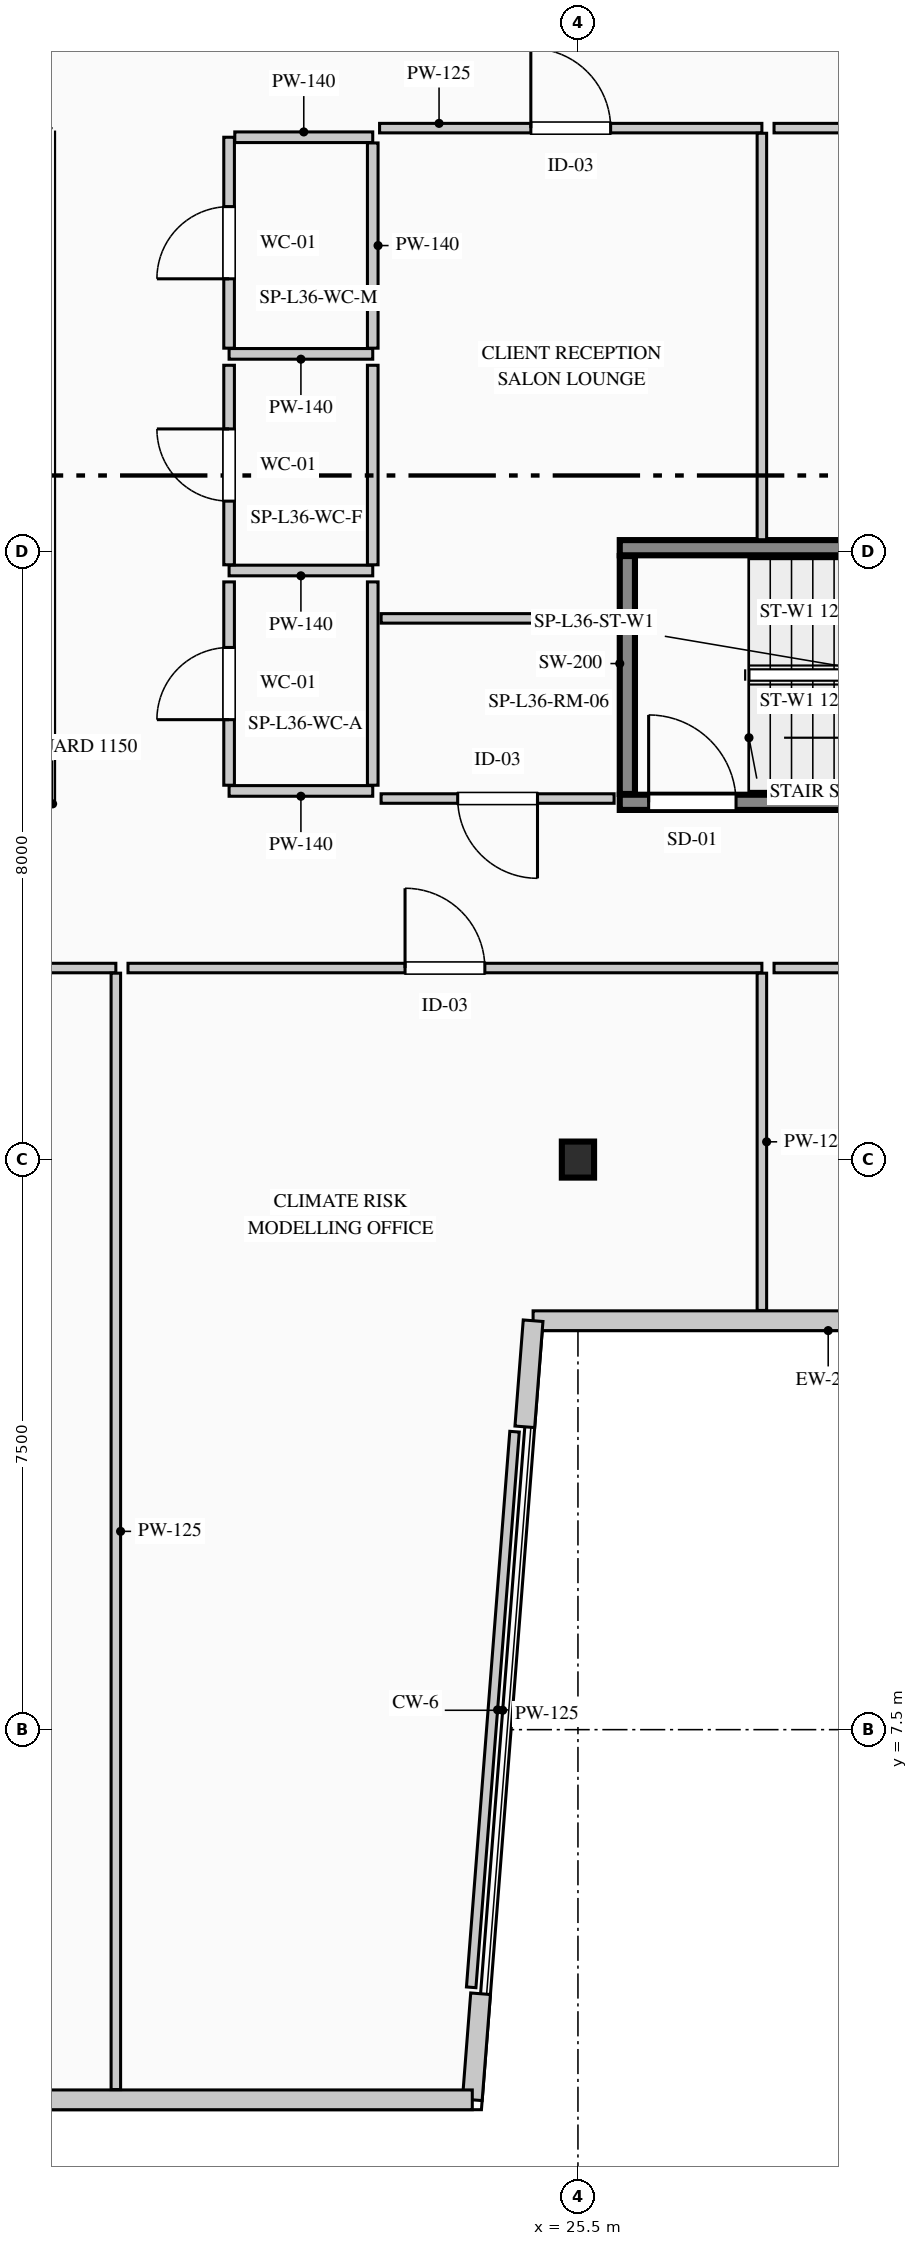
"""IFC4 building model, lengths in metres.
Left out: names, types, materials, properties, quantities, classifications, styles, units other than length and angle.
Written with IfcOpenShell. Run it as: python <this file> out.ifc"""

import sys

from ifc_helpers import new_model, si_unit, direction, frame, frame_2d, origin, origin_2d, place, context, subcontext, project, spatial, rectangle, i_section, extrude, element, fill, save


model = new_model("IFC4")
c1 = context("Model", 3, precision=1e-05, world=origin(), true_north=direction((0.0, 1.0)))
c2 = subcontext(c1, "Body", "Model", "MODEL_VIEW")
j1 = project(units=[si_unit("LENGTHUNIT", "METRE"), si_unit("PLANEANGLEUNIT", "RADIAN")], contexts=[c1])
p1 = place(None, origin())
s1 = spatial("IfcSite", under=j1, at=p1, CompositionType="ELEMENT")
p2 = place(p1, origin())
s2 = spatial("IfcBuilding", under=s1, at=p2, CompositionType="ELEMENT")
p3 = place(p2, frame((0.0, 0.0, 154.85)))
s3 = spatial("IfcBuildingStorey", under=s2, at=p3, CompositionType="ELEMENT", Elevation=154.85)
p4 = place(p3, frame((26.05, 19.7, 0.0), z_axis=(0.0, 0.0, 1.0), x_axis=(1.0, 0.0, 0.0)))
e1 = element("IfcWall", 1, at=p4, inside=s3, PredefinedType="SHEAR", context=c2, shape_type="SweptSolid", body=[
    extrude(rectangle(XDim=7.2, YDim=0.2, at=frame_2d((3.6, 0.0))), origin(), (0.0, 0.0, 1.0), 3.95),
])
p5 = place(p4, frame((0.38, 0.0, 0.0)))
e2 = element("IfcOpeningElement", 2, at=p5, cuts=e1, PredefinedType="OPENING", context=c2, shape_type="SweptSolid", body=[
    extrude(rectangle(XDim=1.15, YDim=2.2, at=frame_2d((0.575, 1.1))), frame((0.0, 0.11, 0.0), z_axis=(0.0, -1.0, 0.0), x_axis=(1.0, 0.0, 0.0)), (0.0, 0.0, 1.0), 0.22),
])
p6 = place(p3, frame((26.05, 23.05, 0.0), z_axis=(0.0, 0.0, 1.0), x_axis=(1.0, 0.0, 0.0)))
e3 = element("IfcWall", 3, at=p6, inside=s3, PredefinedType="SHEAR", context=c2, shape_type="SweptSolid", body=[
    extrude(rectangle(XDim=7.2, YDim=0.2, at=frame_2d((3.6, 0.0))), origin(), (0.0, 0.0, 1.0), 3.95),
])
p7 = place(p3, frame((26.15, 19.81, 0.0), z_axis=(0.0, 0.0, 1.0), x_axis=(0.0, 1.0, 0.0)))
e4 = element("IfcWall", 4, at=p7, inside=s3, PredefinedType="SHEAR", context=c2, shape_type="SweptSolid", body=[
    extrude(rectangle(XDim=3.13, YDim=0.2, at=frame_2d((1.565, 0.0))), origin(), (0.0, 0.0, 1.0), 3.95),
])
p8 = place(p3, frame((25.5, 15.0, 0.0), z_axis=(0.0, 0.0, 1.0), x_axis=(1.0, 0.0, 0.0)))
e5 = element("IfcColumn", 5, at=p8, inside=s3, PredefinedType="COLUMN", context=c2, shape_type="SweptSolid", body=[
    extrude(i_section(OverallWidth=0.424, OverallDepth=0.474, WebThickness=0.048, FlangeThickness=0.077, FilletRadius=0.015, at=origin_2d()), origin(), (0.0, 0.0, 1.0), 3.95),
])
p9 = place(p3, frame((32.675, 12.88, 0.0), z_axis=(0.0, 0.0, 1.0), x_axis=(-1.0, 0.0, 0.0)))
e6 = element("IfcWall", 6, at=p9, inside=s3, PredefinedType="STANDARD", context=c2, shape_type="SweptSolid", body=[
    extrude(rectangle(XDim=7.765, YDim=0.26, at=frame_2d((3.883, 0.0))), origin(), (0.0, 0.0, 1.0), 3.69),
])
p10 = place(p9, frame((1.896, 0.0, 0.9)))
e7 = element("IfcOpeningElement", 7, at=p10, cuts=e6, PredefinedType="OPENING", context=c2, shape_type="SweptSolid", body=[
    extrude(rectangle(XDim=1.8, YDim=2.1, at=frame_2d((0.9, 1.05))), frame((0.0, 0.14, 0.0), z_axis=(0.0, -1.0, 0.0), x_axis=(1.0, 0.0, 0.0)), (0.0, 0.0, 1.0), 0.28),
])
for number, where, z_axis, x_axis in (
    (8, (24.91, 12.88, 0.0), (0.0, 0.0, 1.0), (-0.078, -0.997, 0.0)),
    (9, (24.219, 4.026, 0.0), (0.0, 0.0, 1.0), (-0.078, -0.997, 0.0)),
):
    element("IfcWall", number, at=place(p3, frame(where, z_axis=z_axis, x_axis=x_axis)), inside=s3, PredefinedType="STANDARD", context=c2, shape_type="SweptSolid", body=[
        extrude(rectangle(XDim=1.4, YDim=0.26, at=frame_2d((0.7, 0.0))), origin(), (0.0, 0.0, 1.0), 3.69),
    ])
p11 = place(p3, frame((24.11, 2.63, 0.0), z_axis=(0.0, 0.0, 1.0), x_axis=(-1.0, 0.0, 0.0)))
e10 = element("IfcWall", 10, at=p11, inside=s3, PredefinedType="STANDARD", context=c2, shape_type="SweptSolid", body=[
    extrude(rectangle(XDim=13.71, YDim=0.26, at=frame_2d((6.855, 0.0))), origin(), (0.0, 0.0, 1.0), 3.69),
])
p12 = place(p11, frame((7.724, 0.0, 0.9)))
e11 = element("IfcOpeningElement", 11, at=p12, cuts=e10, PredefinedType="OPENING", context=c2, shape_type="SweptSolid", body=[
    extrude(rectangle(XDim=2.1, YDim=2.0, at=frame_2d((1.05, 1.0))), frame((0.0, 0.14, 0.0), z_axis=(0.0, -1.0, 0.0), x_axis=(1.0, 0.0, 0.0)), (0.0, 0.0, 1.0), 0.28),
])
p13 = place(p3, frame((22.8, 25.6, 0.0), z_axis=(0.0, 0.0, 1.0), x_axis=(-1.0, 0.0, 0.0)))
e12 = element("IfcWall", 12, at=p13, inside=s3, PredefinedType="PARTITIONING", context=c2, shape_type="SweptSolid", body=[
    extrude(rectangle(XDim=1.89, YDim=0.14, at=frame_2d((0.945, 0.0))), origin(), (0.0, 0.0, 1.0), 3.69),
])
p14 = place(p3, frame((20.91, 25.675, 0.0), z_axis=(0.0, 0.0, 1.0), x_axis=(0.0, 1.0, 0.0)))
e13 = element("IfcWall", 13, at=p14, inside=s3, PredefinedType="PARTITIONING", context=c2, shape_type="SweptSolid", body=[
    extrude(rectangle(XDim=2.775, YDim=0.14, at=frame_2d((1.387, 0.0))), origin(), (0.0, 0.0, 1.0), 3.69),
])
p15 = place(p14, frame((0.913, 0.0, 0.0)))
e14 = element("IfcOpeningElement", 14, at=p15, cuts=e13, PredefinedType="OPENING", context=c2, shape_type="SweptSolid", body=[
    extrude(rectangle(XDim=0.95, YDim=2.15, at=frame_2d((0.475, 1.075))), frame((0.0, 0.08, 0.0), z_axis=(0.0, -1.0, 0.0), x_axis=(1.0, 0.0, 0.0)), (0.0, 0.0, 1.0), 0.16),
])
p16 = place(p3, frame((20.985, 28.45, 0.0), z_axis=(0.0, 0.0, 1.0), x_axis=(1.0, 0.0, 0.0)))
e15 = element("IfcWall", 15, at=p16, inside=s3, PredefinedType="PARTITIONING", context=c2, shape_type="SweptSolid", body=[
    extrude(rectangle(XDim=1.815, YDim=0.14, at=frame_2d((0.907, 0.0))), origin(), (0.0, 0.0, 1.0), 3.69),
])
p17 = place(p3, frame((22.8, 28.375, 0.0), z_axis=(0.0, 0.0, 1.0), x_axis=(0.0, -1.0, 0.0)))
e16 = element("IfcWall", 16, at=p17, inside=s3, PredefinedType="PARTITIONING", context=c2, shape_type="SweptSolid", body=[
    extrude(rectangle(XDim=2.7, YDim=0.14, at=frame_2d((1.35, 0.0))), origin(), (0.0, 0.0, 1.0), 3.315),
])
p18 = place(p3, frame((22.8, 22.75, 0.0), z_axis=(0.0, 0.0, 1.0), x_axis=(-1.0, 0.0, 0.0)))
e17 = element("IfcWall", 17, at=p18, inside=s3, PredefinedType="PARTITIONING", context=c2, shape_type="SweptSolid", body=[
    extrude(rectangle(XDim=1.89, YDim=0.14, at=frame_2d((0.945, 0.0))), origin(), (0.0, 0.0, 1.0), 3.69),
])
p19 = place(p3, frame((20.91, 22.825, 0.0), z_axis=(0.0, 0.0, 1.0), x_axis=(0.0, 1.0, 0.0)))
e18 = element("IfcWall", 18, at=p19, inside=s3, PredefinedType="PARTITIONING", context=c2, shape_type="SweptSolid", body=[
    extrude(rectangle(XDim=2.625, YDim=0.14, at=frame_2d((1.312, 0.0))), origin(), (0.0, 0.0, 1.0), 3.69),
])
p20 = place(p19, frame((0.837, 0.0, 0.0)))
e19 = element("IfcOpeningElement", 19, at=p20, cuts=e18, PredefinedType="OPENING", context=c2, shape_type="SweptSolid", body=[
    extrude(rectangle(XDim=0.95, YDim=2.15, at=frame_2d((0.475, 1.075))), frame((0.0, 0.08, 0.0), z_axis=(0.0, -1.0, 0.0), x_axis=(1.0, 0.0, 0.0)), (0.0, 0.0, 1.0), 0.16),
])
p21 = place(p3, frame((22.8, 25.45, 0.0), z_axis=(0.0, 0.0, 1.0), x_axis=(0.0, -1.0, 0.0)))
e20 = element("IfcWall", 20, at=p21, inside=s3, PredefinedType="PARTITIONING", context=c2, shape_type="SweptSolid", body=[
    extrude(rectangle(XDim=2.625, YDim=0.14, at=frame_2d((1.312, 0.0))), origin(), (0.0, 0.0, 1.0), 3.315),
])
p22 = place(p3, frame((22.8, 19.85, 0.0), z_axis=(0.0, 0.0, 1.0), x_axis=(-1.0, 0.0, 0.0)))
e21 = element("IfcWall", 21, at=p22, inside=s3, PredefinedType="PARTITIONING", context=c2, shape_type="SweptSolid", body=[
    extrude(rectangle(XDim=1.89, YDim=0.14, at=frame_2d((0.945, 0.0))), origin(), (0.0, 0.0, 1.0), 3.69),
])
p23 = place(p3, frame((20.91, 19.925, 0.0), z_axis=(0.0, 0.0, 1.0), x_axis=(0.0, 1.0, 0.0)))
e22 = element("IfcWall", 22, at=p23, inside=s3, PredefinedType="PARTITIONING", context=c2, shape_type="SweptSolid", body=[
    extrude(rectangle(XDim=2.675, YDim=0.14, at=frame_2d((1.337, 0.0))), origin(), (0.0, 0.0, 1.0), 3.69),
])
p24 = place(p23, frame((0.863, 0.0, 0.0)))
e23 = element("IfcOpeningElement", 23, at=p24, cuts=e22, PredefinedType="OPENING", context=c2, shape_type="SweptSolid", body=[
    extrude(rectangle(XDim=0.95, YDim=2.15, at=frame_2d((0.475, 1.075))), frame((0.0, 0.08, 0.0), z_axis=(0.0, -1.0, 0.0), x_axis=(1.0, 0.0, 0.0)), (0.0, 0.0, 1.0), 0.16),
])
p25 = place(p3, frame((22.8, 22.6, 0.0), z_axis=(0.0, 0.0, 1.0), x_axis=(0.0, -1.0, 0.0)))
e24 = element("IfcWall", 24, at=p25, inside=s3, PredefinedType="PARTITIONING", context=c2, shape_type="SweptSolid", body=[
    extrude(rectangle(XDim=2.675, YDim=0.14, at=frame_2d((1.337, 0.0))), origin(), (0.0, 0.0, 1.0), 3.315),
])
p26 = place(p3, frame((10.88, 17.52, 0.0), z_axis=(0.0, 0.0, 1.0), x_axis=(1.0, 0.0, 0.0)))
e25 = element("IfcWall", 25, at=p26, inside=s3, PredefinedType="PARTITIONING", context=c2, shape_type="SweptSolid", body=[
    extrude(rectangle(XDim=8.54, YDim=0.125, at=frame_2d((4.27, 0.0))), origin(), (0.0, 0.0, 1.0), 3.69),
])
p27 = place(p26, frame((3.745, 0.0, 0.0)))
e26 = element("IfcOpeningElement", 26, at=p27, cuts=e25, PredefinedType="OPENING", context=c2, shape_type="SweptSolid", body=[
    extrude(rectangle(XDim=1.05, YDim=2.15, at=frame_2d((0.525, 1.075))), frame((0.0, 0.073, 0.0), z_axis=(0.0, -1.0, 0.0), x_axis=(1.0, 0.0, 0.0)), (0.0, 0.0, 1.0), 0.145),
])
p28 = place(p3, frame((19.42, 17.452, 0.0), z_axis=(0.0, 0.0, 1.0), x_axis=(0.0, -1.0, 0.0)))
e27 = element("IfcWall", 27, at=p28, inside=s3, PredefinedType="PARTITIONING", context=c2, shape_type="SweptSolid", body=[
    extrude(rectangle(XDim=14.688, YDim=0.125, at=frame_2d((7.344, 0.0))), origin(), (0.0, 0.0, 1.0), 3.69),
])
p29 = place(p3, frame((24.666, 11.42, 0.0), z_axis=(0.0, 0.0, 1.0), x_axis=(-0.077816821526, -0.996967673642, 0.0)))
e28 = element("IfcWall", 28, at=p29, inside=s3, PredefinedType="PARTITIONING", context=c2, shape_type="SweptSolid", body=[
    extrude(rectangle(XDim=7.332, YDim=0.125, at=frame_2d((3.666, 0.0))), origin(), (0.0, 0.0, 1.0), 3.69),
])
p30 = place(p3, frame((19.58, 17.52, 0.0), z_axis=(0.0, 0.0, 1.0), x_axis=(1.0, 0.0, 0.0)))
e29 = element("IfcWall", 29, at=p30, inside=s3, PredefinedType="PARTITIONING", context=c2, shape_type="SweptSolid", body=[
    extrude(rectangle(XDim=8.34, YDim=0.125, at=frame_2d((4.17, 0.0))), origin(), (0.0, 0.0, 1.0), 3.475),
])
p31 = place(p30, frame((3.645, 0.0, 0.0)))
e30 = element("IfcOpeningElement", 30, at=p31, cuts=e29, PredefinedType="OPENING", context=c2, shape_type="SweptSolid", body=[
    extrude(rectangle(XDim=1.05, YDim=2.15, at=frame_2d((0.525, 1.075))), frame((0.0, 0.073, 0.0), z_axis=(0.0, -1.0, 0.0), x_axis=(1.0, 0.0, 0.0)), (0.0, 0.0, 1.0), 0.145),
])
p32 = place(p3, frame((27.92, 17.452, 0.0), z_axis=(0.0, 0.0, 1.0), x_axis=(0.0, -1.0, 0.0)))
e31 = element("IfcWall", 31, at=p32, inside=s3, PredefinedType="PARTITIONING", context=c2, shape_type="SweptSolid", body=[
    extrude(rectangle(XDim=4.438, YDim=0.125, at=frame_2d((2.219, 0.0))), origin(), (0.0, 0.0, 1.0), 3.69),
])
p33 = place(p3, frame((28.08, 17.52, 0.0), z_axis=(0.0, 0.0, 1.0), x_axis=(1.0, 0.0, 0.0)))
e32 = element("IfcWall", 32, at=p33, inside=s3, PredefinedType="PARTITIONING", context=c2, shape_type="SweptSolid", body=[
    extrude(rectangle(XDim=8.04, YDim=0.125, at=frame_2d((4.02, 0.0))), origin(), (0.0, 0.0, 1.0), 3.475),
])
p34 = place(p33, frame((3.495, 0.0, 0.0)))
e33 = element("IfcOpeningElement", 33, at=p34, cuts=e32, PredefinedType="OPENING", context=c2, shape_type="SweptSolid", body=[
    extrude(rectangle(XDim=1.05, YDim=2.15, at=frame_2d((0.525, 1.075))), frame((0.0, 0.073, 0.0), z_axis=(0.0, -1.0, 0.0), x_axis=(1.0, 0.0, 0.0)), (0.0, 0.0, 1.0), 0.145),
])
p35 = place(p3, frame((25.976, 19.75, 0.0), z_axis=(0.0, 0.0, 1.0), x_axis=(-1.0, 0.0, 0.0)))
e34 = element("IfcWall", 34, at=p35, inside=s3, PredefinedType="PARTITIONING", context=c2, shape_type="SweptSolid", body=[
    extrude(rectangle(XDim=3.066, YDim=0.125, at=frame_2d((1.533, 0.0))), origin(), (0.0, 0.0, 1.0), 3.69),
])
p36 = place(p35, frame((1.008, 0.0, 0.0)))
e35 = element("IfcOpeningElement", 35, at=p36, cuts=e34, PredefinedType="OPENING", context=c2, shape_type="SweptSolid", body=[
    extrude(rectangle(XDim=1.05, YDim=2.15, at=frame_2d((0.525, 1.075))), frame((0.0, 0.073, 0.0), z_axis=(0.0, -1.0, 0.0), x_axis=(1.0, 0.0, 0.0)), (0.0, 0.0, 1.0), 0.145),
])
p37 = place(p3, frame((22.91, 22.12, 0.0), z_axis=(0.0, 0.0, 1.0), x_axis=(1.0, 0.0, 0.0)))
e36 = element("IfcWall", 36, at=p37, inside=s3, PredefinedType="PARTITIONING", context=c2, shape_type="SweptSolid", body=[
    extrude(rectangle(XDim=3.135, YDim=0.125, at=frame_2d((1.567, 0.0))), origin(), (0.0, 0.0, 1.0), 3.69),
])
p38 = place(p3, frame((22.89, 28.57, 0.0), z_axis=(0.0, 0.0, 1.0), x_axis=(1.0, 0.0, 0.0)))
e37 = element("IfcWall", 37, at=p38, inside=s3, PredefinedType="PARTITIONING", context=c2, shape_type="SweptSolid", body=[
    extrude(rectangle(XDim=5.03, YDim=0.125, at=frame_2d((2.515, 0.0))), origin(), (0.0, 0.0, 1.0), 3.475),
])
p39 = place(p38, frame((1.99, 0.0, 0.0)))
e38 = element("IfcOpeningElement", 38, at=p39, cuts=e37, PredefinedType="OPENING", context=c2, shape_type="SweptSolid", body=[
    extrude(rectangle(XDim=1.05, YDim=2.15, at=frame_2d((0.525, 1.075))), frame((0.0, 0.073, 0.0), z_axis=(0.0, -1.0, 0.0), x_axis=(1.0, 0.0, 0.0)), (0.0, 0.0, 1.0), 0.145),
])
p40 = place(p3, frame((27.92, 28.502, 0.0), z_axis=(0.0, 0.0, 1.0), x_axis=(0.0, -1.0, 0.0)))
e39 = element("IfcWall", 39, at=p40, inside=s3, PredefinedType="PARTITIONING", context=c2, shape_type="SweptSolid", body=[
    extrude(rectangle(XDim=5.347, YDim=0.125, at=frame_2d((2.674, 0.0))), origin(), (0.0, 0.0, 1.0), 3.69),
])
p41 = place(p3, frame((28.08, 28.57, 0.0), z_axis=(0.0, 0.0, 1.0), x_axis=(1.0, 0.0, 0.0)))
e40 = element("IfcWall", 40, at=p41, inside=s3, PredefinedType="PARTITIONING", context=c2, shape_type="SweptSolid", body=[
    extrude(rectangle(XDim=6.29, YDim=0.125, at=frame_2d((3.145, 0.0))), origin(), (0.0, 0.0, 1.0), 3.475),
])
p42 = place(p41, frame((2.62, 0.0, 0.0)))
e41 = element("IfcOpeningElement", 41, at=p42, cuts=e40, PredefinedType="OPENING", context=c2, shape_type="SweptSolid", body=[
    extrude(rectangle(XDim=1.05, YDim=2.15, at=frame_2d((0.525, 1.075))), frame((0.0, 0.073, 0.0), z_axis=(0.0, -1.0, 0.0), x_axis=(1.0, 0.0, 0.0)), (0.0, 0.0, 1.0), 0.145),
])
p43 = place(p5, origin())
e42 = element("IfcDoor", 42, at=p43, inside=s3, OperationType="SINGLE_SWING_LEFT", PredefinedType="DOOR", context=c2, shape_type="SweptSolid", body=[
    extrude(rectangle(XDim=1.15, YDim=2.2, at=frame_2d((0.575, 1.1))), frame((0.0, 0.025, 0.0), z_axis=(0.0, -1.0, 0.0), x_axis=(1.0, 0.0, 0.0)), (0.0, 0.0, 1.0), 0.05),
])
fill(e2, e42)
p44 = place(p15, origin())
e43 = element("IfcDoor", 43, at=p44, inside=s3, OperationType="SINGLE_SWING_LEFT", PredefinedType="DOOR", context=c2, shape_type="SweptSolid", body=[
    extrude(rectangle(XDim=0.95, YDim=2.15, at=frame_2d((0.475, 1.075))), frame((0.0, 0.025, 0.0), z_axis=(0.0, -1.0, 0.0), x_axis=(1.0, 0.0, 0.0)), (0.0, 0.0, 1.0), 0.05),
])
fill(e14, e43)
p45 = place(p20, origin())
e44 = element("IfcDoor", 44, at=p45, inside=s3, OperationType="SINGLE_SWING_RIGHT", PredefinedType="DOOR", context=c2, shape_type="SweptSolid", body=[
    extrude(rectangle(XDim=0.95, YDim=2.15, at=frame_2d((0.475, 1.075))), frame((0.0, 0.025, 0.0), z_axis=(0.0, -1.0, 0.0), x_axis=(1.0, 0.0, 0.0)), (0.0, 0.0, 1.0), 0.05),
])
fill(e19, e44)
p46 = place(p24, origin())
e45 = element("IfcDoor", 45, at=p46, inside=s3, OperationType="SINGLE_SWING_LEFT", PredefinedType="DOOR", context=c2, shape_type="SweptSolid", body=[
    extrude(rectangle(XDim=0.95, YDim=2.15, at=frame_2d((0.475, 1.075))), frame((0.0, 0.025, 0.0), z_axis=(0.0, -1.0, 0.0), x_axis=(1.0, 0.0, 0.0)), (0.0, 0.0, 1.0), 0.05),
])
fill(e23, e45)
p47 = place(p31, origin())
e46 = element("IfcDoor", 46, at=p47, inside=s3, OperationType="SINGLE_SWING_LEFT", PredefinedType="DOOR", context=c2, shape_type="SweptSolid", body=[
    extrude(rectangle(XDim=1.05, YDim=2.15, at=frame_2d((0.525, 1.075))), frame((0.0, 0.025, 0.0), z_axis=(0.0, -1.0, 0.0), x_axis=(1.0, 0.0, 0.0)), (0.0, 0.0, 1.0), 0.05),
])
fill(e30, e46)
p48 = place(p36, origin())
e47 = element("IfcDoor", 47, at=p48, inside=s3, OperationType="SINGLE_SWING_LEFT", PredefinedType="DOOR", context=c2, shape_type="SweptSolid", body=[
    extrude(rectangle(XDim=1.05, YDim=2.15, at=frame_2d((0.525, 1.075))), frame((0.0, 0.025, 0.0), z_axis=(0.0, -1.0, 0.0), x_axis=(1.0, 0.0, 0.0)), (0.0, 0.0, 1.0), 0.05),
])
fill(e35, e47)
p49 = place(p39, origin())
e48 = element("IfcDoor", 48, at=p49, inside=s3, OperationType="SINGLE_SWING_LEFT", PredefinedType="DOOR", context=c2, shape_type="SweptSolid", body=[
    extrude(rectangle(XDim=1.05, YDim=2.15, at=frame_2d((0.525, 1.075))), frame((0.0, 0.025, 0.0), z_axis=(0.0, -1.0, 0.0), x_axis=(1.0, 0.0, 0.0)), (0.0, 0.0, 1.0), 0.05),
])
fill(e38, e48)
save(model, sys.argv[1])
